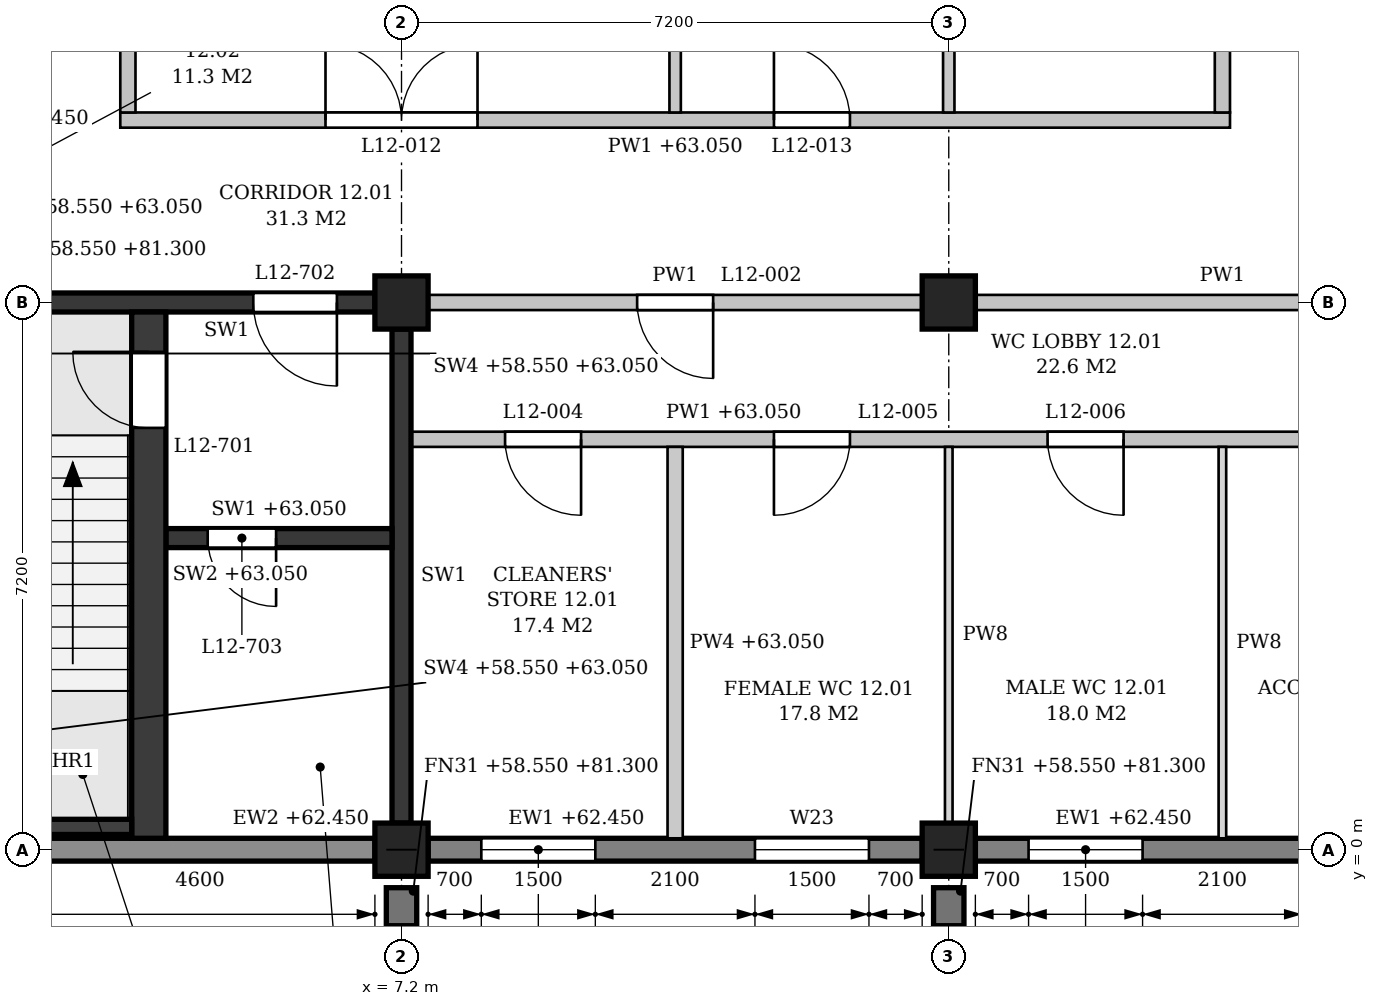
"""IFC4 building model, lengths in metres.
Left out: names, types, materials, properties, quantities, classifications, styles, units other than length and angle.
Written with IfcOpenShell. Run it as: python <this file> out.ifc"""

import sys

from ifc_helpers import new_model, si_unit, direction, frame, frame_2d, origin, origin_2d, place, context, subcontext, project, spatial, polyline, rectangle, outline, extrude, element, fill, save


model = new_model("IFC4")
c1 = context("Model", 3, precision=1e-05, world=origin(), true_north=direction((0.0, 1.0)))
c2 = subcontext(c1, "Body", "Model", "MODEL_VIEW")
j1 = project(units=[si_unit("LENGTHUNIT", "METRE"), si_unit("PLANEANGLEUNIT", "RADIAN")], contexts=[c1])
p1 = place(None, origin())
s1 = spatial("IfcSite", under=j1, at=p1, CompositionType="ELEMENT")
p2 = place(p1, origin())
s2 = spatial("IfcBuilding", under=s1, at=p2, CompositionType="ELEMENT")
p3 = place(p2, frame((0.0, 0.0, 58.8)))
s3 = spatial("IfcBuildingStorey", under=s2, at=p3, CompositionType="ELEMENT", Elevation=58.8)
for number, where, z_axis, x_axis in (
    (1, (7.2, 0.0, 0.0), (0.0, 0.0, 1.0), (1.0, 0.0, 0.0)),
    (2, (7.2, 7.2, 0.0), (0.0, 0.0, 1.0), (1.0, 0.0, 0.0)),
    (3, (14.4, 0.0, 0.0), (0.0, 0.0, 1.0), (1.0, 0.0, 0.0)),
    (4, (14.4, 7.2, 0.0), (0.0, 0.0, 1.0), (1.0, 0.0, 0.0)),
):
    element("IfcColumn", number, at=place(p3, frame(where, z_axis=z_axis, x_axis=x_axis)), inside=s3, PredefinedType="COLUMN", context=c2, shape_type="SweptSolid", body=[
        extrude(rectangle(XDim=0.7, YDim=0.7, at=origin_2d()), origin(), (0.0, 0.0, 1.0), 4.5),
    ])
p4 = place(p3, frame((0.35, 0.0, 0.0), z_axis=(0.0, 0.0, 1.0), x_axis=(1.0, 0.0, 0.0)))
e5 = element("IfcWall", 5, at=p4, inside=s3, PredefinedType="STANDARD", context=c2, shape_type="SweptSolid", body=[
    extrude(rectangle(XDim=6.5, YDim=0.3, at=frame_2d((3.25, 0.0))), origin(), (0.0, 0.0, 1.0), 3.65),
])
p5 = place(p4, frame((1.0, 0.0, 0.9)))
e6 = element("IfcOpeningElement", 6, at=p5, cuts=e5, PredefinedType="OPENING", context=c2, shape_type="SweptSolid", body=[
    extrude(outline(polyline([(0.0, 0.0), (0.9, 0.0), (0.9, 2.25), (0.45, 2.7), (0.0, 2.25), (0.0, 0.0)])), frame((0.0, 0.16, 0.0), z_axis=(0.0, -1.0, 0.0), x_axis=(1.0, 0.0, 0.0)), (0.0, 0.0, 1.0), 0.32),
])
p6 = place(p3, frame((7.55, 0.0, 0.0), z_axis=(0.0, 0.0, 1.0), x_axis=(1.0, 0.0, 0.0)))
e7 = element("IfcWall", 7, at=p6, inside=s3, PredefinedType="STANDARD", context=c2, shape_type="SweptSolid", body=[
    extrude(rectangle(XDim=6.5, YDim=0.3, at=frame_2d((3.25, 0.0))), origin(), (0.0, 0.0, 1.0), 3.65),
])
p7 = place(p6, frame((0.7, 0.0, 0.9)))
e8 = element("IfcOpeningElement", 8, at=p7, cuts=e7, PredefinedType="OPENING", context=c2, shape_type="SweptSolid", body=[
    extrude(outline(polyline([(0.0, 0.0), (1.5, 0.0), (1.5, 1.95), (0.75, 2.7), (0.0, 1.95), (0.0, 0.0)])), frame((0.0, 0.16, 0.0), z_axis=(0.0, -1.0, 0.0), x_axis=(1.0, 0.0, 0.0)), (0.0, 0.0, 1.0), 0.32),
])
p8 = place(p6, frame((4.3, 0.0, 0.9)))
e9 = element("IfcOpeningElement", 9, at=p8, cuts=e7, PredefinedType="OPENING", context=c2, shape_type="SweptSolid", body=[
    extrude(outline(polyline([(0.0, 0.0), (1.5, 0.0), (1.5, 1.95), (0.75, 2.7), (0.0, 1.95), (0.0, 0.0)])), frame((0.0, 0.16, 0.0), z_axis=(0.0, -1.0, 0.0), x_axis=(1.0, 0.0, 0.0)), (0.0, 0.0, 1.0), 0.32),
])
p9 = place(p3, frame((14.75, 0.0, 0.0), z_axis=(0.0, 0.0, 1.0), x_axis=(1.0, 0.0, 0.0)))
e10 = element("IfcWall", 10, at=p9, inside=s3, PredefinedType="STANDARD", context=c2, shape_type="SweptSolid", body=[
    extrude(rectangle(XDim=6.5, YDim=0.3, at=frame_2d((3.25, 0.0))), origin(), (0.0, 0.0, 1.0), 3.65),
])
p10 = place(p9, frame((0.7, 0.0, 0.9)))
e11 = element("IfcOpeningElement", 11, at=p10, cuts=e10, PredefinedType="OPENING", context=c2, shape_type="SweptSolid", body=[
    extrude(outline(polyline([(0.0, 0.0), (1.5, 0.0), (1.5, 1.95), (0.75, 2.7), (0.0, 1.95), (0.0, 0.0)])), frame((0.0, 0.16, 0.0), z_axis=(0.0, -1.0, 0.0), x_axis=(1.0, 0.0, 0.0)), (0.0, 0.0, 1.0), 0.32),
])
p11 = place(p9, frame((4.3, 0.0, 0.9)))
e12 = element("IfcOpeningElement", 12, at=p11, cuts=e10, PredefinedType="OPENING", context=c2, shape_type="SweptSolid", body=[
    extrude(outline(polyline([(0.0, 0.0), (1.5, 0.0), (1.5, 1.95), (0.75, 2.7), (0.0, 1.95), (0.0, 0.0)])), frame((0.0, 0.16, 0.0), z_axis=(0.0, -1.0, 0.0), x_axis=(1.0, 0.0, 0.0)), (0.0, 0.0, 1.0), 0.32),
])
for number, where, z_axis, x_axis in (
    (13, (7.2, -0.5, -0.25), (0.0, 0.0, 1.0), (0.0, -1.0, 0.0)),
    (14, (14.4, -0.5, -0.25), (0.0, 0.0, 1.0), (0.0, -1.0, 0.0)),
):
    element("IfcWall", number, at=place(p3, frame(where, z_axis=z_axis, x_axis=x_axis)), inside=s3, PredefinedType="POLYGONAL", context=c2, shape_type="SweptSolid", body=[
        extrude(outline(polyline([(0.5, 0.0), (0.5, 22.225), (0.15, 22.75), (0.0, 22.75), (0.0, 0.0), (0.5, 0.0)])), frame((0.0, 0.2, 0.0), z_axis=(0.0, -1.0, 0.0), x_axis=(1.0, 0.0, 0.0)), (0.0, 0.0, 1.0), 0.4),
    ])
p12 = place(p3, frame((0.35, 7.2, 0.0), z_axis=(0.0, 0.0, 1.0), x_axis=(1.0, 0.0, 0.0)))
e15 = element("IfcWall", 15, at=p12, inside=s3, PredefinedType="SHEAR", context=c2, shape_type="SweptSolid", body=[
    extrude(rectangle(XDim=6.5, YDim=0.25, at=frame_2d((3.25, 0.0))), origin(), (0.0, 0.0, 1.0), 3.6),
])
p13 = place(p12, frame((4.9, 0.0, 0.0)))
e16 = element("IfcOpeningElement", 16, at=p13, cuts=e15, PredefinedType="OPENING", context=c2, shape_type="SweptSolid", body=[
    extrude(rectangle(XDim=1.1, YDim=2.1, at=frame_2d((0.55, 1.05))), frame((0.0, 0.135, 0.0), z_axis=(0.0, -1.0, 0.0), x_axis=(1.0, 0.0, 0.0)), (0.0, 0.0, 1.0), 0.27),
])
p14 = place(p3, frame((7.2, 0.35, 0.0), z_axis=(0.0, 0.0, 1.0), x_axis=(0.0, 1.0, 0.0)))
e17 = element("IfcWall", 17, at=p14, inside=s3, PredefinedType="SHEAR", context=c2, shape_type="SweptSolid", body=[
    extrude(rectangle(XDim=6.5, YDim=0.25, at=frame_2d((3.25, 0.0))), origin(), (0.0, 0.0, 1.0), 3.6),
])
p15 = place(p3, frame((2.25, 0.3, -0.25), z_axis=(0.0, 0.0, 1.0), x_axis=(1.0, 0.0, 0.0)))
e18 = element("IfcWall", 18, at=p15, inside=s3, PredefinedType="SHEAR", context=c2, shape_type="SweptSolid", body=[
    extrude(rectangle(XDim=1.4, YDim=0.2, at=frame_2d((0.7, 0.0))), origin(), (0.0, 0.0, 1.0), 4.5),
])
p16 = place(p3, frame((3.875, 0.15, 0.0), z_axis=(0.0, 0.0, 1.0), x_axis=(0.0, 1.0, 0.0)))
e19 = element("IfcWall", 19, at=p16, inside=s3, PredefinedType="SHEAR", context=c2, shape_type="SweptSolid", body=[
    extrude(rectangle(XDim=6.925, YDim=0.45, at=frame_2d((3.462, 0.0))), origin(), (0.0, 0.0, 1.0), 4.25),
])
p17 = place(p16, frame((5.4, 0.0, 0.0)))
e20 = element("IfcOpeningElement", 20, at=p17, cuts=e19, PredefinedType="OPENING", context=c2, shape_type="SweptSolid", body=[
    extrude(rectangle(XDim=1.0, YDim=2.1, at=frame_2d((0.5, 1.05))), frame((0.0, 0.235, 0.0), z_axis=(0.0, -1.0, 0.0), x_axis=(1.0, 0.0, 0.0)), (0.0, 0.0, 1.0), 0.47),
])
p18 = place(p3, frame((4.1, 4.1, 0.0), z_axis=(0.0, 0.0, 1.0), x_axis=(1.0, 0.0, 0.0)))
e21 = element("IfcWall", 21, at=p18, inside=s3, PredefinedType="SHEAR", context=c2, shape_type="SweptSolid", body=[
    extrude(rectangle(XDim=2.975, YDim=0.25, at=frame_2d((1.487, 0.0))), origin(), (0.0, 0.0, 1.0), 4.25),
])
p19 = place(p18, frame((0.55, 0.0, 0.0)))
e22 = element("IfcOpeningElement", 22, at=p19, cuts=e21, PredefinedType="OPENING", context=c2, shape_type="SweptSolid", body=[
    extrude(rectangle(XDim=0.9, YDim=2.1, at=frame_2d((0.45, 1.05))), frame((0.0, 0.135, 0.0), z_axis=(0.0, -1.0, 0.0), x_axis=(1.0, 0.0, 0.0)), (0.0, 0.0, 1.0), 0.27),
])
p20 = place(p3, frame((7.325, 5.4, 0.0), z_axis=(0.0, 0.0, 1.0), x_axis=(1.0, 0.0, 0.0)))
e23 = element("IfcWall", 23, at=p20, inside=s3, PredefinedType="PARTITIONING", context=c2, shape_type="SweptSolid", body=[
    extrude(outline(polyline([(0.0, 0.0), (14.15, 0.0), (14.15, 3.6), (14.075, 3.6), (14.075, 4.25), (7.275, 4.25), (7.275, 3.6), (6.875, 3.6), (6.875, 4.25), (0.075, 4.25), (0.075, 3.6), (0.0, 3.6), (0.0, 0.0)])), frame((0.0, 0.1, 0.0), z_axis=(0.0, -1.0, 0.0), x_axis=(1.0, 0.0, 0.0)), (0.0, 0.0, 1.0), 0.2),
])
p21 = place(p20, frame((1.238, 0.0, 0.0)))
e24 = element("IfcOpeningElement", 24, at=p21, cuts=e23, PredefinedType="OPENING", context=c2, shape_type="SweptSolid", body=[
    extrude(rectangle(XDim=1.0, YDim=2.1, at=frame_2d((0.5, 1.05))), frame((0.0, 0.11, 0.0), z_axis=(0.0, -1.0, 0.0), x_axis=(1.0, 0.0, 0.0)), (0.0, 0.0, 1.0), 0.22),
])
p22 = place(p20, frame((4.775, 0.0, 0.0)))
e25 = element("IfcOpeningElement", 25, at=p22, cuts=e23, PredefinedType="OPENING", context=c2, shape_type="SweptSolid", body=[
    extrude(rectangle(XDim=1.0, YDim=2.1, at=frame_2d((0.5, 1.05))), frame((0.0, 0.11, 0.0), z_axis=(0.0, -1.0, 0.0), x_axis=(1.0, 0.0, 0.0)), (0.0, 0.0, 1.0), 0.22),
])
p23 = place(p20, frame((8.375, 0.0, 0.0)))
e26 = element("IfcOpeningElement", 26, at=p23, cuts=e23, PredefinedType="OPENING", context=c2, shape_type="SweptSolid", body=[
    extrude(rectangle(XDim=1.0, YDim=2.1, at=frame_2d((0.5, 1.05))), frame((0.0, 0.11, 0.0), z_axis=(0.0, -1.0, 0.0), x_axis=(1.0, 0.0, 0.0)), (0.0, 0.0, 1.0), 0.22),
])
p24 = place(p20, frame((11.913, 0.0, 0.0)))
e27 = element("IfcOpeningElement", 27, at=p24, cuts=e23, PredefinedType="OPENING", context=c2, shape_type="SweptSolid", body=[
    extrude(rectangle(XDim=1.0, YDim=2.1, at=frame_2d((0.5, 1.05))), frame((0.0, 0.11, 0.0), z_axis=(0.0, -1.0, 0.0), x_axis=(1.0, 0.0, 0.0)), (0.0, 0.0, 1.0), 0.22),
])
p25 = place(p3, frame((7.55, 7.2, 0.0), z_axis=(0.0, 0.0, 1.0), x_axis=(1.0, 0.0, 0.0)))
e28 = element("IfcWall", 28, at=p25, inside=s3, PredefinedType="PARTITIONING", context=c2, shape_type="SweptSolid", body=[
    extrude(rectangle(XDim=6.5, YDim=0.2, at=frame_2d((3.25, 0.0))), origin(), (0.0, 0.0, 1.0), 3.6),
])
p26 = place(p25, frame((2.75, 0.0, 0.0)))
e29 = element("IfcOpeningElement", 29, at=p26, cuts=e28, PredefinedType="OPENING", context=c2, shape_type="SweptSolid", body=[
    extrude(rectangle(XDim=1.0, YDim=2.1, at=frame_2d((0.5, 1.05))), frame((0.0, 0.11, 0.0), z_axis=(0.0, -1.0, 0.0), x_axis=(1.0, 0.0, 0.0)), (0.0, 0.0, 1.0), 0.22),
])
p27 = place(p3, frame((14.75, 7.2, 0.0), z_axis=(0.0, 0.0, 1.0), x_axis=(1.0, 0.0, 0.0)))
e30 = element("IfcWall", 30, at=p27, inside=s3, PredefinedType="PARTITIONING", context=c2, shape_type="SweptSolid", body=[
    extrude(rectangle(XDim=6.5, YDim=0.2, at=frame_2d((3.25, 0.0))), origin(), (0.0, 0.0, 1.0), 3.6),
])
p28 = place(p27, frame((4.375, 0.0, 0.0)))
e31 = element("IfcOpeningElement", 31, at=p28, cuts=e30, PredefinedType="OPENING", context=c2, shape_type="SweptSolid", body=[
    extrude(rectangle(XDim=1.0, YDim=2.1, at=frame_2d((0.5, 1.05))), frame((0.0, 0.11, 0.0), z_axis=(0.0, -1.0, 0.0), x_axis=(1.0, 0.0, 0.0)), (0.0, 0.0, 1.0), 0.22),
])
p29 = place(p3, frame((3.5, 9.6, 0.0), z_axis=(0.0, 0.0, 1.0), x_axis=(1.0, 0.0, 0.0)))
e32 = element("IfcWall", 32, at=p29, inside=s3, PredefinedType="PARTITIONING", context=c2, shape_type="SweptSolid", body=[
    extrude(outline(polyline([(0.0, 0.0), (14.6, 0.0), (14.6, 4.25), (11.1, 4.25), (11.1, 3.6), (10.7, 3.6), (10.7, 4.25), (3.9, 4.25), (3.9, 3.6), (3.5, 3.6), (3.5, 4.25), (0.0, 4.25), (0.0, 0.0)])), frame((0.0, 0.1, 0.0), z_axis=(0.0, -1.0, 0.0), x_axis=(1.0, 0.0, 0.0)), (0.0, 0.0, 1.0), 0.2),
])
p30 = place(p29, frame((2.7, 0.0, 0.0)))
e33 = element("IfcOpeningElement", 33, at=p30, cuts=e32, PredefinedType="OPENING", context=c2, shape_type="SweptSolid", body=[
    extrude(rectangle(XDim=2.0, YDim=2.1, at=frame_2d((1.0, 1.05))), frame((0.0, 0.11, 0.0), z_axis=(0.0, -1.0, 0.0), x_axis=(1.0, 0.0, 0.0)), (0.0, 0.0, 1.0), 0.22),
])
p31 = place(p29, frame((8.6, 0.0, 0.0)))
e34 = element("IfcOpeningElement", 34, at=p31, cuts=e32, PredefinedType="OPENING", context=c2, shape_type="SweptSolid", body=[
    extrude(rectangle(XDim=1.0, YDim=2.1, at=frame_2d((0.5, 1.05))), frame((0.0, 0.11, 0.0), z_axis=(0.0, -1.0, 0.0), x_axis=(1.0, 0.0, 0.0)), (0.0, 0.0, 1.0), 0.22),
])
p32 = place(p3, frame((3.6, 9.7, 0.0), z_axis=(0.0, 0.0, 1.0), x_axis=(0.0, 1.0, 0.0)))
e35 = element("IfcWall", 35, at=p32, inside=s3, PredefinedType="PARTITIONING", context=c2, shape_type="SweptSolid", body=[
    extrude(rectangle(XDim=1.1, YDim=0.2, at=frame_2d((0.55, 0.0))), origin(), (0.0, 0.0, 1.0), 4.25),
])
p33 = place(p3, frame((10.8, 0.15, 0.0), z_axis=(0.0, 0.0, 1.0), x_axis=(0.0, 1.0, 0.0)))
e36 = element("IfcWall", 36, at=p33, inside=s3, PredefinedType="PARTITIONING", context=c2, shape_type="SweptSolid", body=[
    extrude(outline(polyline([(0.0, 0.0), (5.15, 0.0), (5.15, 4.25), (0.05, 4.25), (0.05, 3.65), (0.0, 3.65), (0.0, 0.0)])), frame((0.0, 0.1, 0.0), z_axis=(0.0, -1.0, 0.0), x_axis=(1.0, 0.0, 0.0)), (0.0, 0.0, 1.0), 0.2),
])
p34 = place(p3, frame((10.8, 9.7, 0.0), z_axis=(0.0, 0.0, 1.0), x_axis=(0.0, 1.0, 0.0)))
e37 = element("IfcWall", 37, at=p34, inside=s3, PredefinedType="PARTITIONING", context=c2, shape_type="SweptSolid", body=[
    extrude(rectangle(XDim=4.55, YDim=0.15, at=frame_2d((2.275, 0.0))), origin(), (0.0, 0.0, 1.0), 3.6),
])
p35 = place(p3, frame((14.4, 0.35, 0.0), z_axis=(0.0, 0.0, 1.0), x_axis=(0.0, 1.0, 0.0)))
e38 = element("IfcWall", 38, at=p35, inside=s3, PredefinedType="PARTITIONING", context=c2, shape_type="SweptSolid", body=[
    extrude(rectangle(XDim=4.95, YDim=0.1, at=frame_2d((2.475, 0.0))), origin(), (0.0, 0.0, 1.0), 3.6),
])
p36 = place(p3, frame((14.4, 9.7, 0.0), z_axis=(0.0, 0.0, 1.0), x_axis=(0.0, 1.0, 0.0)))
e39 = element("IfcWall", 39, at=p36, inside=s3, PredefinedType="PARTITIONING", context=c2, shape_type="SweptSolid", body=[
    extrude(rectangle(XDim=4.35, YDim=0.15, at=frame_2d((2.175, 0.0))), origin(), (0.0, 0.0, 1.0), 3.6),
])
p37 = place(p3, frame((18.0, 0.15, 0.0), z_axis=(0.0, 0.0, 1.0), x_axis=(0.0, 1.0, 0.0)))
e40 = element("IfcWall", 40, at=p37, inside=s3, PredefinedType="PARTITIONING", context=c2, shape_type="SweptSolid", body=[
    extrude(rectangle(XDim=5.15, YDim=0.1, at=frame_2d((2.575, 0.0))), origin(), (0.0, 0.0, 1.0), 3.6),
])
p38 = place(p3, frame((18.0, 9.7, 0.0), z_axis=(0.0, 0.0, 1.0), x_axis=(0.0, 1.0, 0.0)))
e41 = element("IfcWall", 41, at=p38, inside=s3, PredefinedType="PARTITIONING", context=c2, shape_type="SweptSolid", body=[
    extrude(outline(polyline([(0.0, 0.0), (7.1, 0.0), (7.1, 4.25), (4.9, 4.25), (4.9, 3.6), (4.5, 3.6), (4.5, 4.25), (0.0, 4.25), (0.0, 0.0)])), frame((0.0, 0.1, 0.0), z_axis=(0.0, -1.0, 0.0), x_axis=(1.0, 0.0, 0.0)), (0.0, 0.0, 1.0), 0.2),
])
p39 = place(p38, frame((5.4, 0.0, 0.0)))
e42 = element("IfcOpeningElement", 42, at=p39, cuts=e41, PredefinedType="OPENING", context=c2, shape_type="SweptSolid", body=[
    extrude(rectangle(XDim=1.0, YDim=2.1, at=frame_2d((0.5, 1.05))), frame((0.0, 0.11, 0.0), z_axis=(0.0, -1.0, 0.0), x_axis=(1.0, 0.0, 0.0)), (0.0, 0.0, 1.0), 0.22),
])
p40 = place(p38, frame((1.85, 0.0, 0.0)))
e43 = element("IfcOpeningElement", 43, at=p40, cuts=e41, PredefinedType="OPENING", context=c2, shape_type="SweptSolid", body=[
    extrude(rectangle(XDim=1.0, YDim=2.1, at=frame_2d((0.5, 1.05))), frame((0.0, 0.11, 0.0), z_axis=(0.0, -1.0, 0.0), x_axis=(1.0, 0.0, 0.0)), (0.0, 0.0, 1.0), 0.22),
])
p41 = place(p7, origin())
e44 = element("IfcWindow", 44, at=p41, inside=s3, PartitioningType="SINGLE_PANEL", PredefinedType="WINDOW", context=c2, shape_type="SweptSolid", body=[
    extrude(outline(polyline([(0.0, 0.0), (1.5, 0.0), (1.5, 1.95), (0.75, 2.7), (0.0, 1.95), (0.0, 0.0)])), frame((0.0, 0.03, 0.0), z_axis=(0.0, -1.0, 0.0), x_axis=(1.0, 0.0, 0.0)), (0.0, 0.0, 1.0), 0.06),
])
fill(e8, e44)
p42 = place(p8, origin())
e45 = element("IfcWindow", 45, at=p42, inside=s3, PartitioningType="SINGLE_PANEL", PredefinedType="WINDOW", context=c2, shape_type="SweptSolid", body=[
    extrude(outline(polyline([(0.0, 0.0), (1.5, 0.0), (1.5, 1.95), (0.75, 2.7), (0.0, 1.95), (0.0, 0.0)])), frame((0.0, 0.03, 0.0), z_axis=(0.0, -1.0, 0.0), x_axis=(1.0, 0.0, 0.0)), (0.0, 0.0, 1.0), 0.06),
])
fill(e9, e45)
p43 = place(p10, origin())
e46 = element("IfcWindow", 46, at=p43, inside=s3, PartitioningType="SINGLE_PANEL", PredefinedType="WINDOW", context=c2, shape_type="SweptSolid", body=[
    extrude(outline(polyline([(0.0, 0.0), (1.5, 0.0), (1.5, 1.95), (0.75, 2.7), (0.0, 1.95), (0.0, 0.0)])), frame((0.0, 0.03, 0.0), z_axis=(0.0, -1.0, 0.0), x_axis=(1.0, 0.0, 0.0)), (0.0, 0.0, 1.0), 0.06),
])
fill(e11, e46)
p44 = place(p17, origin())
e47 = element("IfcDoor", 47, at=p44, inside=s3, OperationType="SINGLE_SWING_RIGHT", PredefinedType="DOOR", context=c2, shape_type="SweptSolid", body=[
    extrude(rectangle(XDim=1.0, YDim=2.1, at=frame_2d((0.5, 1.05))), frame((0.0, 0.025, 0.0), z_axis=(0.0, -1.0, 0.0), x_axis=(1.0, 0.0, 0.0)), (0.0, 0.0, 1.0), 0.05),
])
fill(e20, e47)
p45 = place(p13, frame((1.1, 0.0, 0.0), z_axis=(0.0, 0.0, 1.0), x_axis=(-1.0, 0.0, 0.0)))
e48 = element("IfcDoor", 48, at=p45, inside=s3, OperationType="SINGLE_SWING_LEFT", PredefinedType="DOOR", context=c2, shape_type="SweptSolid", body=[
    extrude(rectangle(XDim=1.1, YDim=2.1, at=frame_2d((0.55, 1.05))), frame((0.0, 0.025, 0.0), z_axis=(0.0, -1.0, 0.0), x_axis=(1.0, 0.0, 0.0)), (0.0, 0.0, 1.0), 0.05),
])
fill(e16, e48)
p46 = place(p19, frame((0.9, 0.0, 0.0), z_axis=(0.0, 0.0, 1.0), x_axis=(-1.0, 0.0, 0.0)))
e49 = element("IfcDoor", 49, at=p46, inside=s3, OperationType="SINGLE_SWING_LEFT", PredefinedType="DOOR", context=c2, shape_type="SweptSolid", body=[
    extrude(rectangle(XDim=0.9, YDim=2.1, at=frame_2d((0.45, 1.05))), frame((0.0, 0.025, 0.0), z_axis=(0.0, -1.0, 0.0), x_axis=(1.0, 0.0, 0.0)), (0.0, 0.0, 1.0), 0.05),
])
fill(e22, e49)
p47 = place(p26, frame((1.0, 0.0, 0.0), z_axis=(0.0, 0.0, 1.0), x_axis=(-1.0, 0.0, 0.0)))
e50 = element("IfcDoor", 50, at=p47, inside=s3, OperationType="SINGLE_SWING_LEFT", PredefinedType="DOOR", context=c2, shape_type="SweptSolid", body=[
    extrude(rectangle(XDim=1.0, YDim=2.1, at=frame_2d((0.5, 1.05))), frame((0.0, 0.025, 0.0), z_axis=(0.0, -1.0, 0.0), x_axis=(1.0, 0.0, 0.0)), (0.0, 0.0, 1.0), 0.05),
])
fill(e29, e50)
p48 = place(p21, frame((1.0, 0.0, 0.0), z_axis=(0.0, 0.0, 1.0), x_axis=(-1.0, 0.0, 0.0)))
e51 = element("IfcDoor", 51, at=p48, inside=s3, OperationType="SINGLE_SWING_LEFT", PredefinedType="DOOR", context=c2, shape_type="SweptSolid", body=[
    extrude(rectangle(XDim=1.0, YDim=2.1, at=frame_2d((0.5, 1.05))), frame((0.0, 0.025, 0.0), z_axis=(0.0, -1.0, 0.0), x_axis=(1.0, 0.0, 0.0)), (0.0, 0.0, 1.0), 0.05),
])
fill(e24, e51)
p49 = place(p22, frame((1.0, 0.0, 0.0), z_axis=(0.0, 0.0, 1.0), x_axis=(-1.0, 0.0, 0.0)))
e52 = element("IfcDoor", 52, at=p49, inside=s3, OperationType="SINGLE_SWING_RIGHT", PredefinedType="DOOR", context=c2, shape_type="SweptSolid", body=[
    extrude(rectangle(XDim=1.0, YDim=2.1, at=frame_2d((0.5, 1.05))), frame((0.0, 0.025, 0.0), z_axis=(0.0, -1.0, 0.0), x_axis=(1.0, 0.0, 0.0)), (0.0, 0.0, 1.0), 0.05),
])
fill(e25, e52)
p50 = place(p23, frame((1.0, 0.0, 0.0), z_axis=(0.0, 0.0, 1.0), x_axis=(-1.0, 0.0, 0.0)))
e53 = element("IfcDoor", 53, at=p50, inside=s3, OperationType="SINGLE_SWING_LEFT", PredefinedType="DOOR", context=c2, shape_type="SweptSolid", body=[
    extrude(rectangle(XDim=1.0, YDim=2.1, at=frame_2d((0.5, 1.05))), frame((0.0, 0.025, 0.0), z_axis=(0.0, -1.0, 0.0), x_axis=(1.0, 0.0, 0.0)), (0.0, 0.0, 1.0), 0.05),
])
fill(e26, e53)
p51 = place(p30, origin())
e54 = element("IfcDoor", 54, at=p51, inside=s3, OperationType="DOUBLE_DOOR_SINGLE_SWING", PredefinedType="DOOR", context=c2, shape_type="SweptSolid", body=[
    extrude(rectangle(XDim=2.0, YDim=2.1, at=frame_2d((1.0, 1.05))), frame((0.0, 0.025, 0.0), z_axis=(0.0, -1.0, 0.0), x_axis=(1.0, 0.0, 0.0)), (0.0, 0.0, 1.0), 0.05),
])
fill(e33, e54)
p52 = place(p31, origin())
e55 = element("IfcDoor", 55, at=p52, inside=s3, OperationType="SINGLE_SWING_LEFT", PredefinedType="DOOR", context=c2, shape_type="SweptSolid", body=[
    extrude(rectangle(XDim=1.0, YDim=2.1, at=frame_2d((0.5, 1.05))), frame((0.0, 0.025, 0.0), z_axis=(0.0, -1.0, 0.0), x_axis=(1.0, 0.0, 0.0)), (0.0, 0.0, 1.0), 0.05),
])
fill(e34, e55)
save(model, sys.argv[1])
